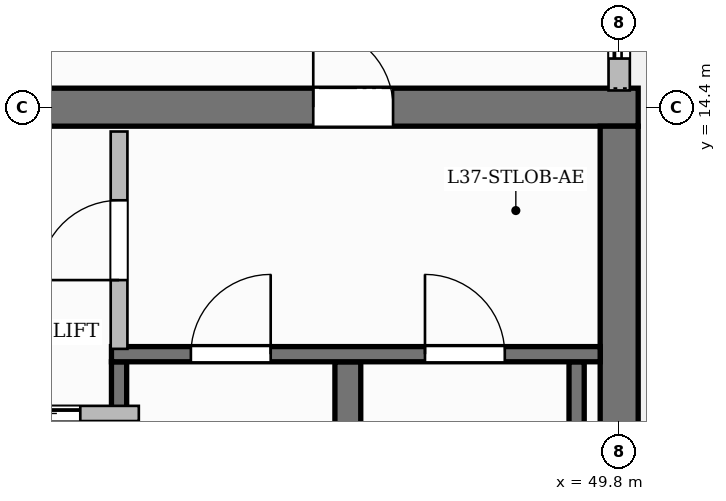
"""IFC4 building model, lengths in metres.
Left out: names, types, materials, properties, quantities, classifications, styles, units other than length and angle.
Written with IfcOpenShell. Run it as: python <this file> out.ifc"""

import sys

from ifc_helpers import new_model, si_unit, direction, frame, frame_2d, origin, place, context, subcontext, project, spatial, rectangle, extrude, source, transform, mapped, element, fill, save


model = new_model("IFC4")
c1 = context("Model", 3, precision=1e-05, world=origin(), true_north=direction((0.0, 1.0)))
c2 = subcontext(c1, "Body", "Model", "MODEL_VIEW")
j1 = project(units=[si_unit("LENGTHUNIT", "METRE"), si_unit("PLANEANGLEUNIT", "RADIAN")], contexts=[c1])
p1 = place(None, origin())
s1 = spatial("IfcSite", under=j1, at=p1, CompositionType="ELEMENT")
p2 = place(p1, origin())
s2 = spatial("IfcBuilding", under=s1, at=p2, CompositionType="ELEMENT")
p3 = place(p2, frame((0.0, 0.0, 150.3)))
s3 = spatial("IfcBuildingStorey", under=s2, at=p3, CompositionType="ELEMENT", Elevation=150.3)
p4 = place(p3, frame((34.55, 14.4, 0.0), z_axis=(0.0, 0.0, 1.0), x_axis=(1.0, 0.0, 0.0)))
e1 = element("IfcWall", 1, at=p4, inside=s3, PredefinedType="SHEAR", context=c2, shape_type="SweptSolid", body=[
    extrude(rectangle(XDim=15.5, YDim=0.5, at=frame_2d((7.75, 0.0))), origin(), (0.0, 0.0, 1.0), 3.85),
])
p5 = place(p4, frame((5.38, 0.0, 0.0)))
e2 = element("IfcOpeningElement", 2, at=p5, cuts=e1, PredefinedType="OPENING", context=c2, shape_type="SweptSolid", body=[
    extrude(rectangle(XDim=1.5, YDim=2.2, at=frame_2d((0.75, 1.1))), frame((0.0, 0.26, 0.0), z_axis=(0.0, -1.0, 0.0), x_axis=(1.0, 0.0, 0.0)), (0.0, 0.0, 1.0), 0.52),
])
p6 = place(p4, frame((1.595, 0.0, 0.0)))
e3 = element("IfcOpeningElement", 3, at=p6, cuts=e1, PredefinedType="OPENING", context=c2, shape_type="SweptSolid", body=[
    extrude(rectangle(XDim=1.05, YDim=2.15, at=frame_2d((0.525, 1.075))), frame((0.0, 0.26, 0.0), z_axis=(0.0, -1.0, 0.0), x_axis=(1.0, 0.0, 0.0)), (0.0, 0.0, 1.0), 0.52),
])
p7 = place(p4, frame((11.225, 0.0, 0.0)))
e4 = element("IfcOpeningElement", 4, at=p7, cuts=e1, PredefinedType="OPENING", context=c2, shape_type="SweptSolid", body=[
    extrude(rectangle(XDim=1.05, YDim=2.15, at=frame_2d((0.525, 1.075))), frame((0.0, 0.26, 0.0), z_axis=(0.0, -1.0, 0.0), x_axis=(1.0, 0.0, 0.0)), (0.0, 0.0, 1.0), 0.52),
])
p8 = place(p3, frame((49.8, 3.85, 0.0), z_axis=(0.0, 0.0, 1.0), x_axis=(0.0, 1.0, 0.0)))
e5 = element("IfcWall", 5, at=p8, inside=s3, PredefinedType="SHEAR", context=c2, shape_type="SweptSolid", body=[
    extrude(rectangle(XDim=10.3, YDim=0.5, at=frame_2d((5.15, 0.0))), origin(), (0.0, 0.0, 1.0), 3.85),
])
p9 = place(p3, frame((43.22, 4.1, 0.0), z_axis=(0.0, 0.0, 1.0), x_axis=(0.0, 1.0, 0.0)))
e6 = element("IfcWall", 6, at=p9, inside=s3, PredefinedType="SHEAR", context=c2, shape_type="SweptSolid", body=[
    extrude(rectangle(XDim=6.95, YDim=0.2, at=frame_2d((3.475, 0.0))), origin(), (0.0, 0.0, 1.0), 3.85),
])
p10 = place(p3, frame((46.23, 4.1, 0.0), z_axis=(0.0, 0.0, 1.0), x_axis=(0.0, 1.0, 0.0)))
e7 = element("IfcWall", 7, at=p10, inside=s3, PredefinedType="SHEAR", context=c2, shape_type="SweptSolid", body=[
    extrude(rectangle(XDim=6.95, YDim=0.34, at=frame_2d((3.475, 0.0))), origin(), (0.0, 0.0, 1.0), 3.85),
])
p11 = place(p3, frame((49.24, 4.1, 0.0), z_axis=(0.0, 0.0, 1.0), x_axis=(0.0, 1.0, 0.0)))
e8 = element("IfcWall", 8, at=p11, inside=s3, PredefinedType="SHEAR", context=c2, shape_type="SweptSolid", body=[
    extrude(rectangle(XDim=6.95, YDim=0.2, at=frame_2d((3.475, 0.0))), origin(), (0.0, 0.0, 1.0), 3.85),
])
p12 = place(p3, frame((43.12, 11.15, 0.0), z_axis=(0.0, 0.0, 1.0), x_axis=(1.0, 0.0, 0.0)))
e9 = element("IfcWall", 9, at=p12, inside=s3, PredefinedType="SHEAR", context=c2, shape_type="SweptSolid", body=[
    extrude(rectangle(XDim=6.43, YDim=0.2, at=frame_2d((3.215, 0.0))), origin(), (0.0, 0.0, 1.0), 3.85),
])
p13 = place(p12, frame((1.045, 0.0, 0.0)))
e10 = element("IfcOpeningElement", 10, at=p13, cuts=e9, PredefinedType="OPENING", context=c2, shape_type="SweptSolid", body=[
    extrude(rectangle(XDim=1.05, YDim=2.2, at=frame_2d((0.525, 1.1))), frame((0.0, 0.11, 0.0), z_axis=(0.0, -1.0, 0.0), x_axis=(1.0, 0.0, 0.0)), (0.0, 0.0, 1.0), 0.22),
])
p14 = place(p12, frame((4.125, 0.0, 0.0)))
e11 = element("IfcOpeningElement", 11, at=p14, cuts=e9, PredefinedType="OPENING", context=c2, shape_type="SweptSolid", body=[
    extrude(rectangle(XDim=1.05, YDim=2.2, at=frame_2d((0.525, 1.1))), frame((0.0, 0.11, 0.0), z_axis=(0.0, -1.0, 0.0), x_axis=(1.0, 0.0, 0.0)), (0.0, 0.0, 1.0), 0.22),
])
p15 = place(p3, frame((43.22, 11.22, 0.0), z_axis=(0.0, 0.0, 1.0), x_axis=(0.0, 1.0, 0.0)))
e12 = element("IfcWall", 12, at=p15, inside=s3, PredefinedType="PARTITIONING", context=c2, shape_type="SweptSolid", body=[
    extrude(rectangle(XDim=2.86, YDim=0.22, at=frame_2d((1.43, 0.0))), origin(), (0.0, 0.0, 1.0), 3.6),
])
p16 = place(p15, frame((0.905, 0.0, 0.0)))
e13 = element("IfcOpeningElement", 13, at=p16, cuts=e12, PredefinedType="OPENING", context=c2, shape_type="SweptSolid", body=[
    extrude(rectangle(XDim=1.05, YDim=2.15, at=frame_2d((0.525, 1.075))), frame((0.0, 0.12, 0.0), z_axis=(0.0, -1.0, 0.0), x_axis=(1.0, 0.0, 0.0)), (0.0, 0.0, 1.0), 0.24),
])
p17 = place(p3, frame((40.84, 10.37, 0.0), z_axis=(0.0, 0.0, 1.0), x_axis=(1.0, 0.0, 0.0)))
e14 = element("IfcWall", 14, at=p17, inside=s3, PredefinedType="PARTITIONING", context=c2, shape_type="SweptSolid", body=[
    extrude(rectangle(XDim=2.64, YDim=0.2, at=frame_2d((1.32, 0.0))), origin(), (0.0, 0.0, 1.0), 3.6),
])
p18 = place(p17, frame((0.77, 0.0, 0.0)))
e15 = element("IfcOpeningElement", 15, at=p18, cuts=e14, PredefinedType="OPENING", context=c2, shape_type="SweptSolid", body=[
    extrude(rectangle(XDim=1.1, YDim=2.2, at=frame_2d((0.55, 1.1))), frame((0.0, 0.11, 0.0), z_axis=(0.0, -1.0, 0.0), x_axis=(1.0, 0.0, 0.0)), (0.0, 0.0, 1.0), 0.22),
])
p19 = place(p3, frame((49.8, 14.62, 0.0), z_axis=(0.0, 0.0, 1.0), x_axis=(0.0, 1.0, 0.0)))
e16 = element("IfcWall", 16, at=p19, inside=s3, PredefinedType="SOLIDWALL", context=c2, shape_type="SweptSolid", body=[
    extrude(rectangle(XDim=6.93, YDim=0.28, at=frame_2d((3.465, 0.0))), origin(), (0.0, 0.0, 1.0), 3.085),
])
p20 = place(p19, frame((0.42, 0.0, 0.0)))
e17 = element("IfcOpeningElement", 17, at=p20, cuts=e16, PredefinedType="OPENING", context=c2, shape_type="SweptSolid", body=[
    extrude(rectangle(XDim=1.2, YDim=2.2, at=frame_2d((0.6, 1.1))), frame((0.0, 0.15, 0.0), z_axis=(0.0, -1.0, 0.0), x_axis=(1.0, 0.0, 0.0)), (0.0, 0.0, 1.0), 0.3),
])
p21 = place(p19, frame((3.384, 0.0, 0.8)))
e18 = element("IfcOpeningElement", 18, at=p21, cuts=e16, PredefinedType="OPENING", context=c2, shape_type="SweptSolid", body=[
    extrude(rectangle(XDim=1.8, YDim=1.85, at=frame_2d((0.9, 0.925))), frame((0.0, 0.15, 0.0), z_axis=(0.0, -1.0, 0.0), x_axis=(1.0, 0.0, 0.0)), (0.0, 0.0, 1.0), 0.3),
])
m1 = source(origin(), c2, "Body", "SweptSolid", [
    extrude(rectangle(XDim=1.05, YDim=2.2, at=frame_2d((0.525, 1.1))), frame((0.0, 0.025, 0.0), z_axis=(0.0, -1.0, 0.0), x_axis=(1.0, 0.0, 0.0)), (0.0, 0.0, 1.0), 0.05),
])
p22 = place(p13, origin())
e19 = element("IfcDoor", 19, at=p22, inside=s3, OperationType="SINGLE_SWING_RIGHT", PredefinedType="DOOR", context=c2, shape_type="MappedRepresentation", body=[
    mapped(m1, transform((0.0, 0.0, 0.0), scale=1.0)),
])
fill(e10, e19)
p23 = place(p14, origin())
e20 = element("IfcDoor", 20, at=p23, inside=s3, OperationType="SINGLE_SWING_LEFT", PredefinedType="DOOR", context=c2, shape_type="MappedRepresentation", body=[
    mapped(m1, transform((0.0, 0.0, 0.0), scale=1.0)),
])
fill(e11, e20)
m2 = source(origin(), c2, "Body", "SweptSolid", [
    extrude(rectangle(XDim=1.05, YDim=2.15, at=frame_2d((0.525, 1.075))), frame((0.0, 0.025, 0.0), z_axis=(0.0, -1.0, 0.0), x_axis=(1.0, 0.0, 0.0)), (0.0, 0.0, 1.0), 0.05),
])
p24 = place(p16, origin())
e21 = element("IfcDoor", 21, at=p24, inside=s3, OperationType="SINGLE_SWING_LEFT", PredefinedType="DOOR", context=c2, shape_type="MappedRepresentation", body=[
    mapped(m2, transform((0.0, 0.0, 0.0), scale=1.0)),
])
fill(e13, e21)
p25 = place(p7, origin())
e22 = element("IfcDoor", 22, at=p25, inside=s3, OperationType="SINGLE_SWING_LEFT", PredefinedType="DOOR", context=c2, shape_type="MappedRepresentation", body=[
    mapped(m2, transform((0.0, 0.0, 0.0), scale=1.0)),
])
fill(e4, e22)
m3 = source(origin(), c2, "Body", "SweptSolid", [
    extrude(rectangle(XDim=1.1, YDim=2.2, at=frame_2d((0.55, 1.1))), frame((0.0, 0.025, 0.0), z_axis=(0.0, -1.0, 0.0), x_axis=(1.0, 0.0, 0.0)), (0.0, 0.0, 1.0), 0.05),
])
p26 = place(p18, origin())
e23 = element("IfcDoor", 23, at=p26, inside=s3, OperationType="SLIDING_TO_LEFT", PredefinedType="DOOR", context=c2, shape_type="MappedRepresentation", body=[
    mapped(m3, transform((0.0, 0.0, 0.0), scale=1.0)),
])
fill(e15, e23)
m4 = source(origin(), c2, "Body", "SweptSolid", [
    extrude(rectangle(XDim=1.2, YDim=2.2, at=frame_2d((0.6, 1.1))), frame((0.0, 0.025, 0.0), z_axis=(0.0, -1.0, 0.0), x_axis=(1.0, 0.0, 0.0)), (0.0, 0.0, 1.0), 0.05),
])
p27 = place(p20, origin())
e24 = element("IfcDoor", 24, at=p27, inside=s3, OperationType="SLIDING_TO_LEFT", PredefinedType="DOOR", context=c2, shape_type="MappedRepresentation", body=[
    mapped(m4, transform((0.0, 0.0, 0.0), scale=1.0)),
])
fill(e17, e24)
save(model, sys.argv[1])
